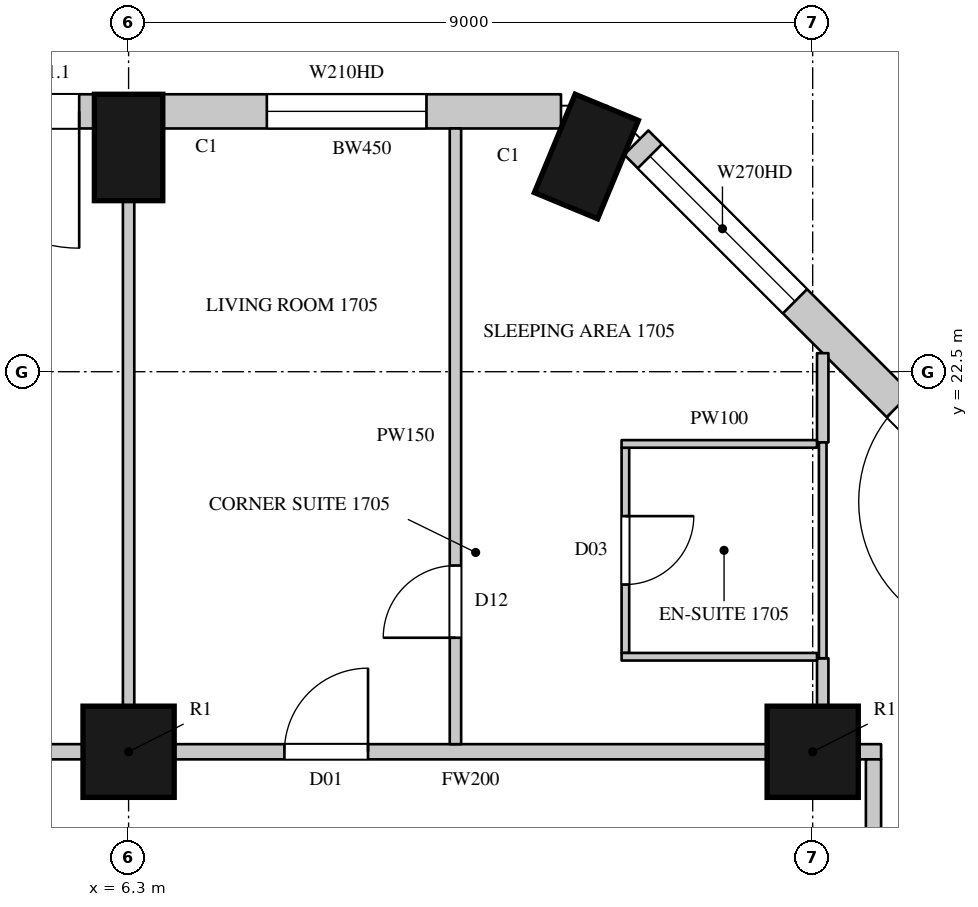
"""IFC4 building model, lengths in metres.
Left out: names, types, materials, properties, quantities, classifications, styles, units other than length and angle.
Written with IfcOpenShell. Run it as: python <this file> out.ifc"""

import sys

from ifc_helpers import new_model, si_unit, direction, frame, frame_2d, origin, origin_2d, place, context, subcontext, project, spatial, rectangle, circle, extrude, element, fill, save


model = new_model("IFC4")
c1 = context("Model", 3, precision=1e-05, world=origin(), true_north=direction((0.0, 1.0)))
c2 = subcontext(c1, "Body", "Model", "MODEL_VIEW")
j1 = project(units=[si_unit("LENGTHUNIT", "METRE"), si_unit("PLANEANGLEUNIT", "RADIAN")], contexts=[c1])
p1 = place(None, origin())
s1 = spatial("IfcSite", under=j1, at=p1, CompositionType="ELEMENT")
p2 = place(p1, origin())
s2 = spatial("IfcBuilding", under=s1, at=p2, CompositionType="ELEMENT")
p3 = place(p2, frame((0.0, 0.0, 91.5)))
s3 = spatial("IfcBuildingStorey", under=s2, at=p3, CompositionType="ELEMENT", Elevation=91.5)
for number, where, z_axis, x_axis in (
    (1, (12.323, 25.331, 0.0), (0.0, 0.0, 1.0), (-0.924, 0.383, 0.0)),
    (2, (6.3, 25.45, 0.0), (0.0, 0.0, 1.0), (-1.0, 0.0, 0.0)),
):
    element("IfcColumn", number, at=place(p3, frame(where, z_axis=z_axis, x_axis=x_axis)), inside=s3, PredefinedType="COLUMN", context=c2, shape_type="SweptSolid", body=[
        extrude(rectangle(XDim=0.9, YDim=1.4, at=origin_2d()), origin(), (0.0, 0.0, 1.0), 3.6),
    ])
for number, where, z_axis, x_axis in (
    (3, (6.3, 17.5, 0.0), (0.0, 0.0, 1.0), (1.0, 0.0, 0.0)),
    (4, (15.3, 17.5, 0.0), (0.0, 0.0, 1.0), (1.0, 0.0, 0.0)),
):
    element("IfcColumn", number, at=place(p3, frame(where, z_axis=z_axis, x_axis=x_axis)), inside=s3, PredefinedType="COLUMN", context=c2, shape_type="SweptSolid", body=[
        extrude(circle(Radius=0.6, at=origin_2d()), origin(), (0.0, 0.0, 1.0), 3.6),
    ])
p4 = place(p3, frame((18.229, 20.265, 0.0), z_axis=(0.0, 0.0, 1.0), x_axis=(-0.707106781187, 0.707106781187, 0.0)))
e5 = element("IfcWall", 5, at=p4, inside=s3, PredefinedType="SOLIDWALL", context=c2, shape_type="SweptSolid", body=[
    extrude(rectangle(XDim=7.424, YDim=0.45, at=frame_2d((3.712, 0.0))), origin(), (0.0, 0.0, 1.0), 3.3),
])
p5 = place(p4, frame((0.74, 0.0, 0.0)))
e6 = element("IfcOpeningElement", 6, at=p5, cuts=e5, PredefinedType="OPENING", context=c2, shape_type="SweptSolid", body=[
    extrude(rectangle(XDim=1.8, YDim=2.4, at=frame_2d((0.9, 1.2))), frame((0.0, 0.235, 0.0), z_axis=(0.0, -1.0, 0.0), x_axis=(1.0, 0.0, 0.0)), (0.0, 0.0, 1.0), 0.47),
])
p6 = place(p4, frame((4.471, 0.0, 1.05)))
e7 = element("IfcOpeningElement", 7, at=p6, cuts=e5, PredefinedType="OPENING", context=c2, shape_type="SweptSolid", body=[
    extrude(rectangle(XDim=2.7, YDim=2.0, at=frame_2d((1.35, 1.0))), frame((0.0, 0.235, 0.0), z_axis=(0.0, -1.0, 0.0), x_axis=(1.0, 0.0, 0.0)), (0.0, 0.0, 1.0), 0.47),
])
p7 = place(p3, frame((11.989, 25.925, 0.0), z_axis=(0.0, 0.0, 1.0), x_axis=(-1.0, 0.0, 0.0)))
e8 = element("IfcWall", 8, at=p7, inside=s3, PredefinedType="SOLIDWALL", context=c2, shape_type="SweptSolid", body=[
    extrude(rectangle(XDim=5.239, YDim=0.45, at=frame_2d((2.619, 0.0))), origin(), (0.0, 0.0, 1.0), 3.3),
])
p8 = place(p7, frame((1.77, 0.0, 1.05)))
e9 = element("IfcOpeningElement", 9, at=p8, cuts=e8, PredefinedType="OPENING", context=c2, shape_type="SweptSolid", body=[
    extrude(rectangle(XDim=2.1, YDim=2.0, at=frame_2d((1.05, 1.0))), frame((0.0, 0.235, 0.0), z_axis=(0.0, -1.0, 0.0), x_axis=(1.0, 0.0, 0.0)), (0.0, 0.0, 1.0), 0.47),
])
p9 = place(p3, frame((5.85, 25.925, 0.0), z_axis=(0.0, 0.0, 1.0), x_axis=(-1.0, 0.0, 0.0)))
e10 = element("IfcWall", 10, at=p9, inside=s3, PredefinedType="SOLIDWALL", context=c2, shape_type="SweptSolid", body=[
    extrude(rectangle(XDim=8.1, YDim=0.45, at=frame_2d((4.05, 0.0))), origin(), (0.0, 0.0, 1.0), 3.3),
])
p10 = place(p9, frame((0.2, 0.0, 0.0)))
e11 = element("IfcOpeningElement", 11, at=p10, cuts=e10, PredefinedType="OPENING", context=c2, shape_type="SweptSolid", body=[
    extrude(rectangle(XDim=1.8, YDim=2.4, at=frame_2d((0.9, 1.2))), frame((0.0, 0.235, 0.0), z_axis=(0.0, -1.0, 0.0), x_axis=(1.0, 0.0, 0.0)), (0.0, 0.0, 1.0), 0.47),
])
p11 = place(p9, frame((2.2, 0.0, 1.05)))
e12 = element("IfcOpeningElement", 12, at=p11, cuts=e10, PredefinedType="OPENING", context=c2, shape_type="SweptSolid", body=[
    extrude(rectangle(XDim=1.2, YDim=2.0, at=frame_2d((0.6, 1.0))), frame((0.0, 0.235, 0.0), z_axis=(0.0, -1.0, 0.0), x_axis=(1.0, 0.0, 0.0)), (0.0, 0.0, 1.0), 0.47),
])
p12 = place(p9, frame((4.7, 0.0, 0.0)))
e13 = element("IfcOpeningElement", 13, at=p12, cuts=e10, PredefinedType="OPENING", context=c2, shape_type="SweptSolid", body=[
    extrude(rectangle(XDim=1.8, YDim=2.4, at=frame_2d((0.9, 1.2))), frame((0.0, 0.235, 0.0), z_axis=(0.0, -1.0, 0.0), x_axis=(1.0, 0.0, 0.0)), (0.0, 0.0, 1.0), 0.47),
])
p13 = place(p9, frame((6.7, 0.0, 1.05)))
e14 = element("IfcOpeningElement", 14, at=p13, cuts=e10, PredefinedType="OPENING", context=c2, shape_type="SweptSolid", body=[
    extrude(rectangle(XDim=1.2, YDim=2.0, at=frame_2d((0.6, 1.0))), frame((0.0, 0.235, 0.0), z_axis=(0.0, -1.0, 0.0), x_axis=(1.0, 0.0, 0.0)), (0.0, 0.0, 1.0), 0.47),
])
p14 = place(p3, frame((16.486, 23.529, 0.0), z_axis=(0.0, 0.0, 1.0), x_axis=(-0.707022305137, 0.707191247145, 0.0)))
e15 = element("IfcWall", 15, at=p14, inside=s3, PredefinedType="SOLIDWALL", context=c2, shape_type="SweptSolid", body=[
    extrude(rectangle(XDim=1.445, YDim=0.45, at=frame_2d((0.723, 0.0))), origin(), (0.0, 0.0, 1.0), 0.6),
])
p15 = place(p3, frame((-2.1, 17.5, 0.0), z_axis=(0.0, 0.0, 1.0), x_axis=(1.0, 0.0, 0.0)))
e16 = element("IfcWall", 16, at=p15, inside=s3, PredefinedType="PARTITIONING", context=c2, shape_type="SweptSolid", body=[
    extrude(rectangle(XDim=7.8, YDim=0.2, at=frame_2d((3.9, 0.0))), origin(), (0.0, 0.0, 1.0), 2.75),
])
p16 = place(p15, frame((4.15, 0.0, 0.0)))
e17 = element("IfcOpeningElement", 17, at=p16, cuts=e16, PredefinedType="OPENING", context=c2, shape_type="SweptSolid", body=[
    extrude(rectangle(XDim=0.95, YDim=2.2, at=frame_2d((0.475, 1.1))), frame((0.0, 0.11, 0.0), z_axis=(0.0, -1.0, 0.0), x_axis=(1.0, 0.0, 0.0)), (0.0, 0.0, 1.0), 0.22),
])
p17 = place(p3, frame((6.9, 17.5, 0.0), z_axis=(0.0, 0.0, 1.0), x_axis=(1.0, 0.0, 0.0)))
e18 = element("IfcWall", 18, at=p17, inside=s3, PredefinedType="PARTITIONING", context=c2, shape_type="SweptSolid", body=[
    extrude(rectangle(XDim=7.8, YDim=0.2, at=frame_2d((3.9, 0.0))), origin(), (0.0, 0.0, 1.0), 2.75),
])
p18 = place(p17, frame((1.45, 0.0, 0.0)))
e19 = element("IfcOpeningElement", 19, at=p18, cuts=e18, PredefinedType="OPENING", context=c2, shape_type="SweptSolid", body=[
    extrude(rectangle(XDim=1.1, YDim=2.4, at=frame_2d((0.55, 1.2))), frame((0.0, 0.11, 0.0), z_axis=(0.0, -1.0, 0.0), x_axis=(1.0, 0.0, 0.0)), (0.0, 0.0, 1.0), 0.22),
])
p19 = place(p3, frame((15.9, 17.5, 0.0), z_axis=(0.0, 0.0, 1.0), x_axis=(1.0, 0.0, 0.0)))
e20 = element("IfcWall", 20, at=p19, inside=s3, PredefinedType="PARTITIONING", context=c2, shape_type="SweptSolid", body=[
    extrude(rectangle(XDim=0.3, YDim=0.2, at=frame_2d((0.15, 0.0))), origin(), (0.0, 0.0, 1.0), 3.3),
])
p20 = place(p3, frame((16.1, 4.75, 0.0), z_axis=(0.0, 0.0, 1.0), x_axis=(0.0, 1.0, 0.0)))
e21 = element("IfcWall", 21, at=p20, inside=s3, PredefinedType="PARTITIONING", context=c2, shape_type="SweptSolid", body=[
    extrude(rectangle(XDim=12.65, YDim=0.2, at=frame_2d((6.325, 0.0))), origin(), (0.0, 0.0, 1.0), 3.3),
])
p21 = place(p20, frame((0.5, 0.0, 0.0)))
e22 = element("IfcOpeningElement", 22, at=p21, cuts=e21, PredefinedType="OPENING", context=c2, shape_type="SweptSolid", body=[
    extrude(rectangle(XDim=0.95, YDim=2.2, at=frame_2d((0.475, 1.1))), frame((0.0, 0.11, 0.0), z_axis=(0.0, -1.0, 0.0), x_axis=(1.0, 0.0, 0.0)), (0.0, 0.0, 1.0), 0.22),
])
p22 = place(p20, frame((6.9, 0.0, 0.0)))
e23 = element("IfcOpeningElement", 23, at=p22, cuts=e21, PredefinedType="OPENING", context=c2, shape_type="SweptSolid", body=[
    extrude(rectangle(XDim=0.95, YDim=2.2, at=frame_2d((0.475, 1.1))), frame((0.0, 0.11, 0.0), z_axis=(0.0, -1.0, 0.0), x_axis=(1.0, 0.0, 0.0)), (0.0, 0.0, 1.0), 0.22),
])
p23 = place(p3, frame((6.3, 18.1, 0.0), z_axis=(0.0, 0.0, 1.0), x_axis=(0.0, 1.0, 0.0)))
e24 = element("IfcWall", 24, at=p23, inside=s3, PredefinedType="PARTITIONING", context=c2, shape_type="SweptSolid", body=[
    extrude(rectangle(XDim=6.65, YDim=0.15, at=frame_2d((3.325, 0.0))), origin(), (0.0, 0.0, 1.0), 2.75),
])
p24 = place(p3, frame((10.6, 17.6, 0.0), z_axis=(0.0, 0.0, 1.0), x_axis=(0.0, 1.0, 0.0)))
e25 = element("IfcWall", 25, at=p24, inside=s3, PredefinedType="PARTITIONING", context=c2, shape_type="SweptSolid", body=[
    extrude(rectangle(XDim=8.1, YDim=0.15, at=frame_2d((4.05, 0.0))), origin(), (0.0, 0.0, 1.0), 3.3),
])
p25 = place(p24, frame((1.4, 0.0, 0.0)))
e26 = element("IfcOpeningElement", 26, at=p25, cuts=e25, PredefinedType="OPENING", context=c2, shape_type="SweptSolid", body=[
    extrude(rectangle(XDim=0.95, YDim=2.2, at=frame_2d((0.475, 1.1))), frame((0.0, 0.085, 0.0), z_axis=(0.0, -1.0, 0.0), x_axis=(1.0, 0.0, 0.0)), (0.0, 0.0, 1.0), 0.17),
])
p26 = place(p3, frame((15.432, 18.094, 0.0), z_axis=(0.0, 0.0, 1.0), x_axis=(0.0, 1.0, 0.0)))
e27 = element("IfcWall", 27, at=p26, inside=s3, PredefinedType="PARTITIONING", context=c2, shape_type="SweptSolid", body=[
    extrude(rectangle(XDim=0.636, YDim=0.15, at=frame_2d((0.318, 0.0))), origin(), (0.0, 0.0, 1.0), 3.3),
])
p27 = place(p3, frame((15.432, 21.57, 0.0), z_axis=(0.0, 0.0, 1.0), x_axis=(0.0, 1.0, 0.0)))
e28 = element("IfcWall", 28, at=p27, inside=s3, PredefinedType="PARTITIONING", context=c2, shape_type="SweptSolid", body=[
    extrude(rectangle(XDim=1.174, YDim=0.15, at=frame_2d((0.587, 0.0))), origin(), (0.0, 0.0, 1.0), 3.3),
])
p28 = place(p3, frame((12.836, 18.8, 0.0), z_axis=(0.0, 0.0, 1.0), x_axis=(0.0, 1.0, 0.0)))
e29 = element("IfcWall", 29, at=p28, inside=s3, PredefinedType="PARTITIONING", context=c2, shape_type="SweptSolid", body=[
    extrude(rectangle(XDim=2.7, YDim=0.1, at=frame_2d((1.35, 0.0))), origin(), (0.0, 0.0, 1.0), 3.3),
])
p29 = place(p28, frame((0.9, 0.0, 0.0)))
e30 = element("IfcOpeningElement", 30, at=p29, cuts=e29, PredefinedType="OPENING", context=c2, shape_type="SweptSolid", body=[
    extrude(rectangle(XDim=0.9, YDim=2.2, at=frame_2d((0.45, 1.1))), frame((0.0, 0.06, 0.0), z_axis=(0.0, -1.0, 0.0), x_axis=(1.0, 0.0, 0.0)), (0.0, 0.0, 1.0), 0.12),
])
for number, where, z_axis, x_axis in (
    (31, (12.786, 18.75, 0.0), (0.0, 0.0, 1.0), (1.0, 0.0, 0.0)),
    (32, (12.786, 21.55, 0.0), (0.0, 0.0, 1.0), (1.0, 0.0, 0.0)),
):
    element("IfcWall", number, at=place(p3, frame(where, z_axis=z_axis, x_axis=x_axis)), inside=s3, PredefinedType="PARTITIONING", context=c2, shape_type="SweptSolid", body=[
        extrude(rectangle(XDim=2.571, YDim=0.1, at=frame_2d((1.286, 0.0))), origin(), (0.0, 0.0, 1.0), 3.3),
    ])
p30 = place(p3, frame((15.432, 18.73, 0.0), z_axis=(0.0, 0.0, 1.0), x_axis=(0.0, 1.0, 0.0)))
e33 = element("IfcWall", 33, at=p30, inside=s3, PredefinedType="PARTITIONING", context=c2, shape_type="SweptSolid", body=[
    extrude(rectangle(XDim=2.84, YDim=0.1, at=frame_2d((1.42, 0.0))), origin(), (0.0, 0.0, 1.0), 3.3),
])
p31 = place(p5, origin())
e34 = element("IfcDoor", 34, at=p31, inside=s3, OperationType="SLIDING_TO_LEFT", PredefinedType="DOOR", context=c2, shape_type="SweptSolid", body=[
    extrude(rectangle(XDim=1.8, YDim=2.4, at=frame_2d((0.9, 1.2))), frame((0.0, 0.13, 0.0), z_axis=(0.0, -1.0, 0.0), x_axis=(1.0, 0.0, 0.0)), (0.0, 0.0, 1.0), 0.05),
])
fill(e6, e34)
p32 = place(p6, origin())
e35 = element("IfcWindow", 35, at=p32, inside=s3, PartitioningType="SINGLE_PANEL", PredefinedType="WINDOW", context=c2, shape_type="SweptSolid", body=[
    extrude(rectangle(XDim=2.7, YDim=2.0, at=frame_2d((1.35, 1.0))), frame((0.0, 0.135, 0.0), z_axis=(0.0, -1.0, 0.0), x_axis=(1.0, 0.0, 0.0)), (0.0, 0.0, 1.0), 0.06),
])
fill(e7, e35)
p33 = place(p10, origin())
e36 = element("IfcDoor", 36, at=p33, inside=s3, OperationType="SLIDING_TO_LEFT", PredefinedType="DOOR", context=c2, shape_type="SweptSolid", body=[
    extrude(rectangle(XDim=1.8, YDim=2.4, at=frame_2d((0.9, 1.2))), frame((0.0, 0.13, 0.0), z_axis=(0.0, -1.0, 0.0), x_axis=(1.0, 0.0, 0.0)), (0.0, 0.0, 1.0), 0.05),
])
fill(e11, e36)
p34 = place(p18, origin())
e37 = element("IfcDoor", 37, at=p34, inside=s3, OperationType="SINGLE_SWING_RIGHT", PredefinedType="DOOR", context=c2, shape_type="SweptSolid", body=[
    extrude(rectangle(XDim=1.1, YDim=2.4, at=frame_2d((0.55, 1.2))), frame((0.0, 0.025, 0.0), z_axis=(0.0, -1.0, 0.0), x_axis=(1.0, 0.0, 0.0)), (0.0, 0.0, 1.0), 0.05),
])
fill(e19, e37)
p35 = place(p25, origin())
e38 = element("IfcDoor", 38, at=p35, inside=s3, OperationType="SINGLE_SWING_LEFT", PredefinedType="DOOR", context=c2, shape_type="SweptSolid", body=[
    extrude(rectangle(XDim=0.95, YDim=2.2, at=frame_2d((0.475, 1.1))), frame((0.0, 0.025, 0.0), z_axis=(0.0, -1.0, 0.0), x_axis=(1.0, 0.0, 0.0)), (0.0, 0.0, 1.0), 0.05),
])
fill(e26, e38)
p36 = place(p29, origin())
e39 = element("IfcDoor", 39, at=p36, inside=s3, OperationType="SINGLE_SWING_LEFT", PredefinedType="DOOR", context=c2, shape_type="SweptSolid", body=[
    extrude(rectangle(XDim=0.9, YDim=2.2, at=frame_2d((0.45, 1.1))), frame((0.0, 0.025, 0.0), z_axis=(0.0, -1.0, 0.0), x_axis=(1.0, 0.0, 0.0)), (0.0, 0.0, 1.0), 0.05),
])
fill(e30, e39)
p37 = place(p8, origin())
e40 = element("IfcWindow", 40, at=p37, inside=s3, PartitioningType="SINGLE_PANEL", PredefinedType="WINDOW", context=c2, shape_type="SweptSolid", body=[
    extrude(rectangle(XDim=2.1, YDim=2.0, at=frame_2d((1.05, 1.0))), frame((0.0, 0.135, 0.0), z_axis=(0.0, -1.0, 0.0), x_axis=(1.0, 0.0, 0.0)), (0.0, 0.0, 1.0), 0.06),
])
fill(e9, e40)
save(model, sys.argv[1])
